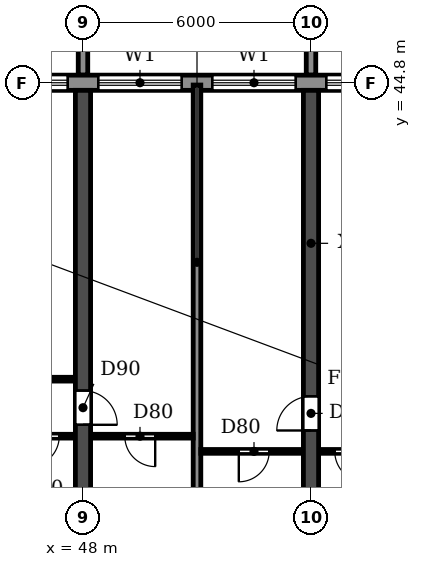
"""IFC4 building model, lengths in metres.
Left out: names, types, materials, properties, quantities, classifications, styles, units other than length and angle.
Written with IfcOpenShell. Run it as: python <this file> out.ifc"""

import sys

from ifc_helpers import new_model, si_unit, direction, frame, frame_2d, origin, place, context, subcontext, project, spatial, polyline, rectangle, outline, extrude, source, transform, mapped, element, fill, save


model = new_model("IFC4")
c1 = context("Model", 3, precision=1e-05, world=origin(), true_north=direction((0.0, 1.0)))
c2 = subcontext(c1, "Body", "Model", "MODEL_VIEW")
j1 = project(units=[si_unit("LENGTHUNIT", "METRE"), si_unit("PLANEANGLEUNIT", "RADIAN")], contexts=[c1])
p1 = place(None, origin())
s1 = spatial("IfcSite", under=j1, at=p1, CompositionType="ELEMENT")
p2 = place(p1, origin())
s2 = spatial("IfcBuilding", under=s1, at=p2, CompositionType="ELEMENT")
p3 = place(p2, frame((0.0, 0.0, 56.4)))
s3 = spatial("IfcBuildingStorey", under=s2, at=p3, CompositionType="ELEMENT", Elevation=56.4)
p4 = place(p3, frame((48.0, 30.55, 0.0), z_axis=(0.0, 0.0, 1.0), x_axis=(0.0, 1.0, 0.0)))
e1 = element("IfcWall", 1, at=p4, inside=s3, PredefinedType="SHEAR", context=c2, shape_type="SweptSolid", body=[
    extrude(rectangle(XDim=14.05, YDim=0.4, at=frame_2d((7.025, 0.0))), origin(), (0.0, 0.0, 1.0), 3.05),
])
p5 = place(p4, frame((5.25, 0.0, 0.0)))
e2 = element("IfcOpeningElement", 2, at=p5, cuts=e1, PredefinedType="OPENING", context=c2, shape_type="SweptSolid", body=[
    extrude(rectangle(XDim=0.9, YDim=2.1, at=frame_2d((0.45, 1.05))), frame((0.0, 0.21, 0.0), z_axis=(0.0, -1.0, 0.0), x_axis=(1.0, 0.0, 0.0)), (0.0, 0.0, 1.0), 0.42),
])
p6 = place(p3, frame((54.0, 30.55, 0.0), z_axis=(0.0, 0.0, 1.0), x_axis=(0.0, 1.0, 0.0)))
e3 = element("IfcWall", 3, at=p6, inside=s3, PredefinedType="SHEAR", context=c2, shape_type="SweptSolid", body=[
    extrude(rectangle(XDim=14.05, YDim=0.4, at=frame_2d((7.025, 0.0))), origin(), (0.0, 0.0, 1.0), 3.05),
])
p7 = place(p6, frame((5.1, 0.0, 0.0)))
e4 = element("IfcOpeningElement", 4, at=p7, cuts=e3, PredefinedType="OPENING", context=c2, shape_type="SweptSolid", body=[
    extrude(rectangle(XDim=0.9, YDim=2.1, at=frame_2d((0.45, 1.05))), frame((0.0, 0.21, 0.0), z_axis=(0.0, -1.0, 0.0), x_axis=(1.0, 0.0, 0.0)), (0.0, 0.0, 1.0), 0.42),
])
p8 = place(p3, frame((91.317, 44.8, 0.0), z_axis=(0.0, 0.0, 1.0), x_axis=(-1.0, 0.0, 0.0)))
e5 = element("IfcWall", 5, at=p8, inside=s3, PredefinedType="STANDARD", context=c2, shape_type="SweptSolid", body=[
    extrude(rectangle(XDim=80.634, YDim=0.4, at=frame_2d((40.317, 0.0))), origin(), (0.0, 0.0, 1.0), 3.05),
])
p9 = place(p8, frame((76.717, 0.0, 0.9)))
e6 = element("IfcOpeningElement", 6, at=p9, cuts=e5, PredefinedType="OPENING", context=c2, shape_type="SweptSolid", body=[
    extrude(rectangle(XDim=2.2, YDim=1.5, at=frame_2d((1.1, 0.75))), frame((0.0, 0.21, 0.0), z_axis=(0.0, -1.0, 0.0), x_axis=(1.0, 0.0, 0.0)), (0.0, 0.0, 1.0), 0.42),
])
p10 = place(p8, frame((73.917, 0.0, 0.0)))
e7 = element("IfcOpeningElement", 7, at=p10, cuts=e5, PredefinedType="OPENING", context=c2, shape_type="SweptSolid", body=[
    extrude(rectangle(XDim=1.8, YDim=2.4, at=frame_2d((0.9, 1.2))), frame((0.0, 0.21, 0.0), z_axis=(0.0, -1.0, 0.0), x_axis=(1.0, 0.0, 0.0)), (0.0, 0.0, 1.0), 0.42),
])
p11 = place(p8, frame((70.717, 0.0, 0.9)))
e8 = element("IfcOpeningElement", 8, at=p11, cuts=e5, PredefinedType="OPENING", context=c2, shape_type="SweptSolid", body=[
    extrude(rectangle(XDim=2.2, YDim=1.5, at=frame_2d((1.1, 0.75))), frame((0.0, 0.21, 0.0), z_axis=(0.0, -1.0, 0.0), x_axis=(1.0, 0.0, 0.0)), (0.0, 0.0, 1.0), 0.42),
])
p12 = place(p8, frame((67.917, 0.0, 0.0)))
e9 = element("IfcOpeningElement", 9, at=p12, cuts=e5, PredefinedType="OPENING", context=c2, shape_type="SweptSolid", body=[
    extrude(rectangle(XDim=1.8, YDim=2.4, at=frame_2d((0.9, 1.2))), frame((0.0, 0.21, 0.0), z_axis=(0.0, -1.0, 0.0), x_axis=(1.0, 0.0, 0.0)), (0.0, 0.0, 1.0), 0.42),
])
p13 = place(p8, frame((64.717, 0.0, 0.9)))
e10 = element("IfcOpeningElement", 10, at=p13, cuts=e5, PredefinedType="OPENING", context=c2, shape_type="SweptSolid", body=[
    extrude(rectangle(XDim=2.2, YDim=1.5, at=frame_2d((1.1, 0.75))), frame((0.0, 0.21, 0.0), z_axis=(0.0, -1.0, 0.0), x_axis=(1.0, 0.0, 0.0)), (0.0, 0.0, 1.0), 0.42),
])
p14 = place(p8, frame((61.917, 0.0, 0.0)))
e11 = element("IfcOpeningElement", 11, at=p14, cuts=e5, PredefinedType="OPENING", context=c2, shape_type="SweptSolid", body=[
    extrude(rectangle(XDim=1.8, YDim=2.4, at=frame_2d((0.9, 1.2))), frame((0.0, 0.21, 0.0), z_axis=(0.0, -1.0, 0.0), x_axis=(1.0, 0.0, 0.0)), (0.0, 0.0, 1.0), 0.42),
])
p15 = place(p8, frame((58.717, 0.0, 0.9)))
e12 = element("IfcOpeningElement", 12, at=p15, cuts=e5, PredefinedType="OPENING", context=c2, shape_type="SweptSolid", body=[
    extrude(rectangle(XDim=2.2, YDim=1.5, at=frame_2d((1.1, 0.75))), frame((0.0, 0.21, 0.0), z_axis=(0.0, -1.0, 0.0), x_axis=(1.0, 0.0, 0.0)), (0.0, 0.0, 1.0), 0.42),
])
p16 = place(p8, frame((55.717, 0.0, 0.9)))
e13 = element("IfcOpeningElement", 13, at=p16, cuts=e5, PredefinedType="OPENING", context=c2, shape_type="SweptSolid", body=[
    extrude(rectangle(XDim=2.2, YDim=1.5, at=frame_2d((1.1, 0.75))), frame((0.0, 0.21, 0.0), z_axis=(0.0, -1.0, 0.0), x_axis=(1.0, 0.0, 0.0)), (0.0, 0.0, 1.0), 0.42),
])
p17 = place(p8, frame((52.917, 0.0, 0.0)))
e14 = element("IfcOpeningElement", 14, at=p17, cuts=e5, PredefinedType="OPENING", context=c2, shape_type="SweptSolid", body=[
    extrude(rectangle(XDim=1.8, YDim=2.4, at=frame_2d((0.9, 1.2))), frame((0.0, 0.21, 0.0), z_axis=(0.0, -1.0, 0.0), x_axis=(1.0, 0.0, 0.0)), (0.0, 0.0, 1.0), 0.42),
])
p18 = place(p8, frame((49.717, 0.0, 0.9)))
e15 = element("IfcOpeningElement", 15, at=p18, cuts=e5, PredefinedType="OPENING", context=c2, shape_type="SweptSolid", body=[
    extrude(rectangle(XDim=2.2, YDim=1.5, at=frame_2d((1.1, 0.75))), frame((0.0, 0.21, 0.0), z_axis=(0.0, -1.0, 0.0), x_axis=(1.0, 0.0, 0.0)), (0.0, 0.0, 1.0), 0.42),
])
p19 = place(p8, frame((46.917, 0.0, 0.0)))
e16 = element("IfcOpeningElement", 16, at=p19, cuts=e5, PredefinedType="OPENING", context=c2, shape_type="SweptSolid", body=[
    extrude(rectangle(XDim=1.8, YDim=2.4, at=frame_2d((0.9, 1.2))), frame((0.0, 0.21, 0.0), z_axis=(0.0, -1.0, 0.0), x_axis=(1.0, 0.0, 0.0)), (0.0, 0.0, 1.0), 0.42),
])
p20 = place(p8, frame((43.717, 0.0, 0.9)))
e17 = element("IfcOpeningElement", 17, at=p20, cuts=e5, PredefinedType="OPENING", context=c2, shape_type="SweptSolid", body=[
    extrude(rectangle(XDim=2.2, YDim=1.5, at=frame_2d((1.1, 0.75))), frame((0.0, 0.21, 0.0), z_axis=(0.0, -1.0, 0.0), x_axis=(1.0, 0.0, 0.0)), (0.0, 0.0, 1.0), 0.42),
])
p21 = place(p8, frame((40.717, 0.0, 0.9)))
e18 = element("IfcOpeningElement", 18, at=p21, cuts=e5, PredefinedType="OPENING", context=c2, shape_type="SweptSolid", body=[
    extrude(rectangle(XDim=2.2, YDim=1.5, at=frame_2d((1.1, 0.75))), frame((0.0, 0.21, 0.0), z_axis=(0.0, -1.0, 0.0), x_axis=(1.0, 0.0, 0.0)), (0.0, 0.0, 1.0), 0.42),
])
p22 = place(p8, frame((37.717, 0.0, 0.9)))
e19 = element("IfcOpeningElement", 19, at=p22, cuts=e5, PredefinedType="OPENING", context=c2, shape_type="SweptSolid", body=[
    extrude(rectangle(XDim=2.2, YDim=1.5, at=frame_2d((1.1, 0.75))), frame((0.0, 0.21, 0.0), z_axis=(0.0, -1.0, 0.0), x_axis=(1.0, 0.0, 0.0)), (0.0, 0.0, 1.0), 0.42),
])
p23 = place(p8, frame((34.717, 0.0, 0.9)))
e20 = element("IfcOpeningElement", 20, at=p23, cuts=e5, PredefinedType="OPENING", context=c2, shape_type="SweptSolid", body=[
    extrude(rectangle(XDim=2.2, YDim=1.5, at=frame_2d((1.1, 0.75))), frame((0.0, 0.21, 0.0), z_axis=(0.0, -1.0, 0.0), x_axis=(1.0, 0.0, 0.0)), (0.0, 0.0, 1.0), 0.42),
])
p24 = place(p8, frame((31.917, 0.0, 0.0)))
e21 = element("IfcOpeningElement", 21, at=p24, cuts=e5, PredefinedType="OPENING", context=c2, shape_type="SweptSolid", body=[
    extrude(rectangle(XDim=1.8, YDim=2.4, at=frame_2d((0.9, 1.2))), frame((0.0, 0.21, 0.0), z_axis=(0.0, -1.0, 0.0), x_axis=(1.0, 0.0, 0.0)), (0.0, 0.0, 1.0), 0.42),
])
p25 = place(p8, frame((28.917, 0.0, 0.0)))
e22 = element("IfcOpeningElement", 22, at=p25, cuts=e5, PredefinedType="OPENING", context=c2, shape_type="SweptSolid", body=[
    extrude(rectangle(XDim=1.8, YDim=2.4, at=frame_2d((0.9, 1.2))), frame((0.0, 0.21, 0.0), z_axis=(0.0, -1.0, 0.0), x_axis=(1.0, 0.0, 0.0)), (0.0, 0.0, 1.0), 0.42),
])
p26 = place(p8, frame((25.717, 0.0, 0.9)))
e23 = element("IfcOpeningElement", 23, at=p26, cuts=e5, PredefinedType="OPENING", context=c2, shape_type="SweptSolid", body=[
    extrude(rectangle(XDim=2.2, YDim=1.5, at=frame_2d((1.1, 0.75))), frame((0.0, 0.21, 0.0), z_axis=(0.0, -1.0, 0.0), x_axis=(1.0, 0.0, 0.0)), (0.0, 0.0, 1.0), 0.42),
])
p27 = place(p8, frame((22.917, 0.0, 0.0)))
e24 = element("IfcOpeningElement", 24, at=p27, cuts=e5, PredefinedType="OPENING", context=c2, shape_type="SweptSolid", body=[
    extrude(rectangle(XDim=1.8, YDim=2.4, at=frame_2d((0.9, 1.2))), frame((0.0, 0.21, 0.0), z_axis=(0.0, -1.0, 0.0), x_axis=(1.0, 0.0, 0.0)), (0.0, 0.0, 1.0), 0.42),
])
p28 = place(p8, frame((19.717, 0.0, 0.9)))
e25 = element("IfcOpeningElement", 25, at=p28, cuts=e5, PredefinedType="OPENING", context=c2, shape_type="SweptSolid", body=[
    extrude(rectangle(XDim=2.2, YDim=1.5, at=frame_2d((1.1, 0.75))), frame((0.0, 0.21, 0.0), z_axis=(0.0, -1.0, 0.0), x_axis=(1.0, 0.0, 0.0)), (0.0, 0.0, 1.0), 0.42),
])
p29 = place(p8, frame((16.917, 0.0, 0.0)))
e26 = element("IfcOpeningElement", 26, at=p29, cuts=e5, PredefinedType="OPENING", context=c2, shape_type="SweptSolid", body=[
    extrude(rectangle(XDim=1.8, YDim=2.4, at=frame_2d((0.9, 1.2))), frame((0.0, 0.21, 0.0), z_axis=(0.0, -1.0, 0.0), x_axis=(1.0, 0.0, 0.0)), (0.0, 0.0, 1.0), 0.42),
])
p30 = place(p8, frame((13.717, 0.0, 0.9)))
e27 = element("IfcOpeningElement", 27, at=p30, cuts=e5, PredefinedType="OPENING", context=c2, shape_type="SweptSolid", body=[
    extrude(rectangle(XDim=2.2, YDim=1.5, at=frame_2d((1.1, 0.75))), frame((0.0, 0.21, 0.0), z_axis=(0.0, -1.0, 0.0), x_axis=(1.0, 0.0, 0.0)), (0.0, 0.0, 1.0), 0.42),
])
p31 = place(p8, frame((10.917, 0.0, 0.0)))
e28 = element("IfcOpeningElement", 28, at=p31, cuts=e5, PredefinedType="OPENING", context=c2, shape_type="SweptSolid", body=[
    extrude(rectangle(XDim=1.8, YDim=2.4, at=frame_2d((0.9, 1.2))), frame((0.0, 0.21, 0.0), z_axis=(0.0, -1.0, 0.0), x_axis=(1.0, 0.0, 0.0)), (0.0, 0.0, 1.0), 0.42),
])
p32 = place(p8, frame((7.717, 0.0, 0.9)))
e29 = element("IfcOpeningElement", 29, at=p32, cuts=e5, PredefinedType="OPENING", context=c2, shape_type="SweptSolid", body=[
    extrude(rectangle(XDim=2.2, YDim=1.5, at=frame_2d((1.1, 0.75))), frame((0.0, 0.21, 0.0), z_axis=(0.0, -1.0, 0.0), x_axis=(1.0, 0.0, 0.0)), (0.0, 0.0, 1.0), 0.42),
])
p33 = place(p8, frame((4.717, 0.0, 0.9)))
e30 = element("IfcOpeningElement", 30, at=p33, cuts=e5, PredefinedType="OPENING", context=c2, shape_type="SweptSolid", body=[
    extrude(rectangle(XDim=2.2, YDim=1.5, at=frame_2d((1.1, 0.75))), frame((0.0, 0.21, 0.0), z_axis=(0.0, -1.0, 0.0), x_axis=(1.0, 0.0, 0.0)), (0.0, 0.0, 1.0), 0.42),
])
p34 = place(p8, frame((1.717, 0.0, 0.9)))
e31 = element("IfcOpeningElement", 31, at=p34, cuts=e5, PredefinedType="OPENING", context=c2, shape_type="SweptSolid", body=[
    extrude(rectangle(XDim=2.2, YDim=1.5, at=frame_2d((1.1, 0.75))), frame((0.0, 0.21, 0.0), z_axis=(0.0, -1.0, 0.0), x_axis=(1.0, 0.0, 0.0)), (0.0, 0.0, 1.0), 0.42),
])
m1 = source(origin(), c2, "Body", "SweptSolid", [
    extrude(outline(polyline([(0.0, 0.0), (0.25, 0.0), (0.25, 3.1), (0.0, 3.1), (0.0, 0.0)])), origin(), (0.0, 0.0, 1.0), 3.1),
])
for number, where in (
    (32, (47.875, 45.0, 0.0)),
    (33, (53.875, 45.0, 0.0)),
):
    element("IfcWall", number, at=place(p3, frame(where)), inside=s3, PredefinedType="STANDARD", context=c2, shape_type="MappedRepresentation", body=[
        mapped(m1, transform((0.0, 0.0, 0.0))),
    ])
p35 = place(p3, frame((51.0, 30.56, 0.0), z_axis=(0.0, 0.0, 1.0), x_axis=(0.0, 1.0, 0.0)))
e34 = element("IfcWall", 34, at=p35, inside=s3, PredefinedType="PARTITIONING", context=c2, shape_type="SweptSolid", body=[
    extrude(rectangle(XDim=14.18, YDim=0.2, at=frame_2d((7.09, 0.0))), origin(), (0.0, 0.0, 1.0), 3.05),
])
p36 = place(p3, frame((51.1, 35.1, 0.0), z_axis=(0.0, 0.0, 1.0), x_axis=(1.0, 0.0, 0.0)))
e35 = element("IfcWall", 35, at=p36, inside=s3, PredefinedType="PARTITIONING", context=c2, shape_type="SweptSolid", body=[
    extrude(rectangle(XDim=2.69, YDim=0.1, at=frame_2d((1.345, 0.0))), origin(), (0.0, 0.0, 1.0), 3.05),
])
p37 = place(p36, frame((1.0, 0.0, 0.0)))
e36 = element("IfcOpeningElement", 36, at=p37, cuts=e35, PredefinedType="OPENING", context=c2, shape_type="SweptSolid", body=[
    extrude(rectangle(XDim=0.8, YDim=2.1, at=frame_2d((0.4, 1.05))), frame((0.0, 0.06, 0.0), z_axis=(0.0, -1.0, 0.0), x_axis=(1.0, 0.0, 0.0)), (0.0, 0.0, 1.0), 0.12),
])
p38 = place(p3, frame((54.21, 35.1, 0.0), z_axis=(0.0, 0.0, 1.0), x_axis=(1.0, 0.0, 0.0)))
e37 = element("IfcWall", 37, at=p38, inside=s3, PredefinedType="PARTITIONING", context=c2, shape_type="SweptSolid", body=[
    extrude(rectangle(XDim=1.89, YDim=0.1, at=frame_2d((0.945, 0.0))), origin(), (0.0, 0.0, 1.0), 3.05),
])
p39 = place(p38, frame((0.415, 0.0, 0.0)))
e38 = element("IfcOpeningElement", 38, at=p39, cuts=e37, PredefinedType="OPENING", context=c2, shape_type="SweptSolid", body=[
    extrude(rectangle(XDim=0.8, YDim=2.1, at=frame_2d((0.4, 1.05))), frame((0.0, 0.06, 0.0), z_axis=(0.0, -1.0, 0.0), x_axis=(1.0, 0.0, 0.0)), (0.0, 0.0, 1.0), 0.12),
])
p40 = place(p3, frame((45.9, 35.5, 0.0), z_axis=(0.0, 0.0, 1.0), x_axis=(1.0, 0.0, 0.0)))
e39 = element("IfcWall", 39, at=p40, inside=s3, PredefinedType="PARTITIONING", context=c2, shape_type="SweptSolid", body=[
    extrude(rectangle(XDim=1.89, YDim=0.1, at=frame_2d((0.945, 0.0))), origin(), (0.0, 0.0, 1.0), 3.05),
])
p41 = place(p40, frame((0.675, 0.0, 0.0)))
e40 = element("IfcOpeningElement", 40, at=p41, cuts=e39, PredefinedType="OPENING", context=c2, shape_type="SweptSolid", body=[
    extrude(rectangle(XDim=0.8, YDim=2.1, at=frame_2d((0.4, 1.05))), frame((0.0, 0.06, 0.0), z_axis=(0.0, -1.0, 0.0), x_axis=(1.0, 0.0, 0.0)), (0.0, 0.0, 1.0), 0.12),
])
p42 = place(p3, frame((48.21, 35.5, 0.0), z_axis=(0.0, 0.0, 1.0), x_axis=(1.0, 0.0, 0.0)))
e41 = element("IfcWall", 41, at=p42, inside=s3, PredefinedType="PARTITIONING", context=c2, shape_type="SweptSolid", body=[
    extrude(rectangle(XDim=2.69, YDim=0.1, at=frame_2d((1.345, 0.0))), origin(), (0.0, 0.0, 1.0), 3.05),
])
p43 = place(p42, frame((0.89, 0.0, 0.0)))
e42 = element("IfcOpeningElement", 42, at=p43, cuts=e41, PredefinedType="OPENING", context=c2, shape_type="SweptSolid", body=[
    extrude(rectangle(XDim=0.8, YDim=2.1, at=frame_2d((0.4, 1.05))), frame((0.0, 0.06, 0.0), z_axis=(0.0, -1.0, 0.0), x_axis=(1.0, 0.0, 0.0)), (0.0, 0.0, 1.0), 0.12),
])
p44 = place(p3, frame((44.95, 37.0, 0.0), z_axis=(0.0, 0.0, 1.0), x_axis=(1.0, 0.0, 0.0)))
e43 = element("IfcWall", 43, at=p44, inside=s3, PredefinedType="PARTITIONING", context=c2, shape_type="SweptSolid", body=[
    extrude(rectangle(XDim=2.84, YDim=0.1, at=frame_2d((1.42, 0.0))), origin(), (0.0, 0.0, 1.0), 3.05),
])
p45 = place(p44, frame((0.55, 0.0, 0.0)))
e44 = element("IfcOpeningElement", 44, at=p45, cuts=e43, PredefinedType="OPENING", context=c2, shape_type="SweptSolid", body=[
    extrude(rectangle(XDim=0.9, YDim=2.1, at=frame_2d((0.45, 1.05))), frame((0.0, 0.06, 0.0), z_axis=(0.0, -1.0, 0.0), x_axis=(1.0, 0.0, 0.0)), (0.0, 0.0, 1.0), 0.12),
])
p46 = place(p20, origin())
e45 = element("IfcWindow", 45, at=p46, inside=s3, PartitioningType="DOUBLE_PANEL_HORIZONTAL", PredefinedType="WINDOW", context=c2, shape_type="SweptSolid", body=[
    extrude(rectangle(XDim=2.2, YDim=1.5, at=frame_2d((1.1, 0.75))), frame((0.0, 0.03, 0.0), z_axis=(0.0, -1.0, 0.0), x_axis=(1.0, 0.0, 0.0)), (0.0, 0.0, 1.0), 0.06),
])
fill(e17, e45)
p47 = place(p21, origin())
e46 = element("IfcWindow", 46, at=p47, inside=s3, PartitioningType="DOUBLE_PANEL_HORIZONTAL", PredefinedType="WINDOW", context=c2, shape_type="SweptSolid", body=[
    extrude(rectangle(XDim=2.2, YDim=1.5, at=frame_2d((1.1, 0.75))), frame((0.0, 0.03, 0.0), z_axis=(0.0, -1.0, 0.0), x_axis=(1.0, 0.0, 0.0)), (0.0, 0.0, 1.0), 0.06),
])
fill(e18, e46)
p48 = place(p22, origin())
e47 = element("IfcWindow", 47, at=p48, inside=s3, PartitioningType="DOUBLE_PANEL_HORIZONTAL", PredefinedType="WINDOW", context=c2, shape_type="SweptSolid", body=[
    extrude(rectangle(XDim=2.2, YDim=1.5, at=frame_2d((1.1, 0.75))), frame((0.0, 0.03, 0.0), z_axis=(0.0, -1.0, 0.0), x_axis=(1.0, 0.0, 0.0)), (0.0, 0.0, 1.0), 0.06),
])
fill(e19, e47)
p49 = place(p23, origin())
e48 = element("IfcWindow", 48, at=p49, inside=s3, PartitioningType="DOUBLE_PANEL_HORIZONTAL", PredefinedType="WINDOW", context=c2, shape_type="SweptSolid", body=[
    extrude(rectangle(XDim=2.2, YDim=1.5, at=frame_2d((1.1, 0.75))), frame((0.0, 0.03, 0.0), z_axis=(0.0, -1.0, 0.0), x_axis=(1.0, 0.0, 0.0)), (0.0, 0.0, 1.0), 0.06),
])
fill(e20, e48)
p50 = place(p43, frame((0.8, 0.0, 0.0), z_axis=(0.0, 0.0, 1.0), x_axis=(-1.0, 0.0, 0.0)))
e49 = element("IfcDoor", 49, at=p50, inside=s3, OperationType="SINGLE_SWING_LEFT", PredefinedType="DOOR", context=c2, shape_type="SweptSolid", body=[
    extrude(rectangle(XDim=0.8, YDim=2.1, at=frame_2d((0.4, 1.05))), frame((0.0, 0.025, 0.0), z_axis=(0.0, -1.0, 0.0), x_axis=(1.0, 0.0, 0.0)), (0.0, 0.0, 1.0), 0.05),
])
fill(e42, e49)
p51 = place(p41, frame((0.8, 0.0, 0.0), z_axis=(0.0, 0.0, 1.0), x_axis=(-1.0, 0.0, 0.0)))
e50 = element("IfcDoor", 50, at=p51, inside=s3, OperationType="SINGLE_SWING_RIGHT", PredefinedType="DOOR", context=c2, shape_type="SweptSolid", body=[
    extrude(rectangle(XDim=0.8, YDim=2.1, at=frame_2d((0.4, 1.05))), frame((0.0, 0.025, 0.0), z_axis=(0.0, -1.0, 0.0), x_axis=(1.0, 0.0, 0.0)), (0.0, 0.0, 1.0), 0.05),
])
fill(e40, e50)
p52 = place(p5, frame((0.9, 0.0, 0.0), z_axis=(0.0, 0.0, 1.0), x_axis=(-1.0, 0.0, 0.0)))
e51 = element("IfcDoor", 51, at=p52, inside=s3, OperationType="SINGLE_SWING_RIGHT", PredefinedType="DOOR", context=c2, shape_type="SweptSolid", body=[
    extrude(rectangle(XDim=0.9, YDim=2.1, at=frame_2d((0.45, 1.05))), frame((0.0, 0.025, 0.0), z_axis=(0.0, -1.0, 0.0), x_axis=(1.0, 0.0, 0.0)), (0.0, 0.0, 1.0), 0.05),
])
fill(e2, e51)
p53 = place(p37, frame((0.8, 0.0, 0.0), z_axis=(0.0, 0.0, 1.0), x_axis=(-1.0, 0.0, 0.0)))
e52 = element("IfcDoor", 52, at=p53, inside=s3, OperationType="SINGLE_SWING_RIGHT", PredefinedType="DOOR", context=c2, shape_type="SweptSolid", body=[
    extrude(rectangle(XDim=0.8, YDim=2.1, at=frame_2d((0.4, 1.05))), frame((0.0, 0.025, 0.0), z_axis=(0.0, -1.0, 0.0), x_axis=(1.0, 0.0, 0.0)), (0.0, 0.0, 1.0), 0.05),
])
fill(e36, e52)
p54 = place(p7, origin())
e53 = element("IfcDoor", 53, at=p54, inside=s3, OperationType="SINGLE_SWING_LEFT", PredefinedType="DOOR", context=c2, shape_type="SweptSolid", body=[
    extrude(rectangle(XDim=0.9, YDim=2.1, at=frame_2d((0.45, 1.05))), frame((0.0, 0.025, 0.0), z_axis=(0.0, -1.0, 0.0), x_axis=(1.0, 0.0, 0.0)), (0.0, 0.0, 1.0), 0.05),
])
fill(e4, e53)
p55 = place(p39, frame((0.8, 0.0, 0.0), z_axis=(0.0, 0.0, 1.0), x_axis=(-1.0, 0.0, 0.0)))
e54 = element("IfcDoor", 54, at=p55, inside=s3, OperationType="SINGLE_SWING_LEFT", PredefinedType="DOOR", context=c2, shape_type="SweptSolid", body=[
    extrude(rectangle(XDim=0.8, YDim=2.1, at=frame_2d((0.4, 1.05))), frame((0.0, 0.025, 0.0), z_axis=(0.0, -1.0, 0.0), x_axis=(1.0, 0.0, 0.0)), (0.0, 0.0, 1.0), 0.05),
])
fill(e38, e54)
save(model, sys.argv[1])
